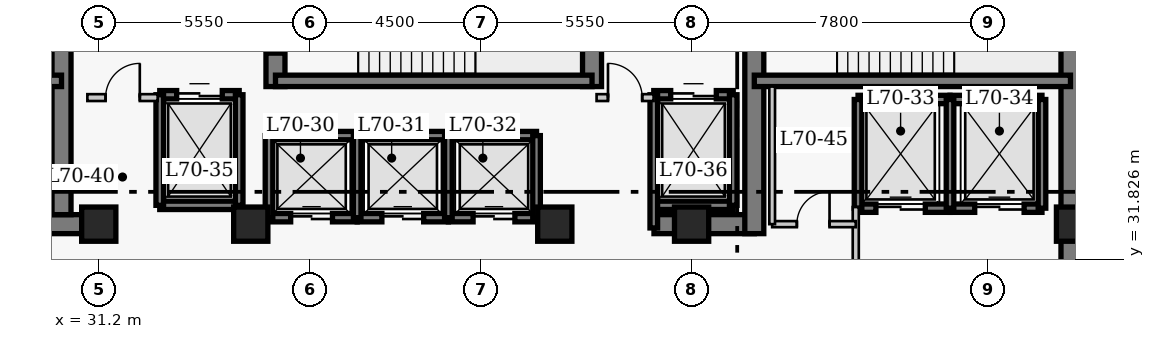
"""IFC4 building model, lengths in metres.
Left out: names, types, materials, properties, quantities, classifications, styles, units other than length and angle.
Written with IfcOpenShell. Run it as: python <this file> out.ifc"""

import sys

from ifc_helpers import new_model, si_unit, direction, frame, frame_2d, origin, origin_2d, place, context, subcontext, project, spatial, rectangle, extrude, element, fill, save


model = new_model("IFC4")
c1 = context("Model", 3, precision=1e-05, world=origin(), true_north=direction((0.0, 1.0)))
c2 = subcontext(c1, "Body", "Model", "MODEL_VIEW")
j1 = project(units=[si_unit("LENGTHUNIT", "METRE"), si_unit("PLANEANGLEUNIT", "RADIAN")], contexts=[c1])
p1 = place(None, origin())
s1 = spatial("IfcSite", under=j1, at=p1, CompositionType="ELEMENT")
p2 = place(p1, origin())
s2 = spatial("IfcBuilding", under=s1, at=p2, CompositionType="ELEMENT")
p3 = place(p2, frame((0.0, 0.0, 281.4)))
s3 = spatial("IfcBuildingStorey", under=s2, at=p3, CompositionType="ELEMENT", Elevation=281.4)
p4 = place(p3, frame((56.77, 27.05, 0.0), z_axis=(0.0, 0.0, 1.0), x_axis=(0.0, 1.0, 0.0)))
e1 = element("IfcWall", 1, at=p4, inside=s3, PredefinedType="SHEAR", context=c2, shape_type="SweptSolid", body=[
    extrude(rectangle(XDim=13.52, YDim=0.5, at=frame_2d((6.76, 0.0))), origin(), (0.0, 0.0, 1.0), 4.0),
])
p5 = place(p3, frame((28.45, 32.75, 0.0), z_axis=(0.0, 0.0, 1.0), x_axis=(1.0, 0.0, 0.0)))
e2 = element("IfcWall", 2, at=p5, inside=s3, PredefinedType="SHEAR", context=c2, shape_type="SweptSolid", body=[
    extrude(rectangle(XDim=2.4, YDim=0.5, at=frame_2d((1.2, 0.0))), origin(), (0.0, 0.0, 1.0), 4.0),
])
p6 = place(p3, frame((45.81, 32.75, 0.0), z_axis=(0.0, 0.0, 1.0), x_axis=(1.0, 0.0, 0.0)))
e3 = element("IfcWall", 3, at=p6, inside=s3, PredefinedType="SHEAR", context=c2, shape_type="SweptSolid", body=[
    extrude(rectangle(XDim=2.64, YDim=0.5, at=frame_2d((1.32, 0.0))), origin(), (0.0, 0.0, 1.0), 4.0),
])
p7 = place(p3, frame((30.22, 33.0, 0.0), z_axis=(0.0, 0.0, 1.0), x_axis=(0.0, 1.0, 0.0)))
e4 = element("IfcWall", 4, at=p7, inside=s3, PredefinedType="SHEAR", context=c2, shape_type="SweptSolid", body=[
    extrude(rectangle(XDim=7.32, YDim=0.5, at=frame_2d((3.66, 0.0))), origin(), (0.0, 0.0, 1.0), 4.0),
])
p8 = place(p3, frame((35.85, 36.37, 0.0), z_axis=(0.0, 0.0, 1.0), x_axis=(0.0, 1.0, 0.0)))
e5 = element("IfcWall", 5, at=p8, inside=s3, PredefinedType="SHEAR", context=c2, shape_type="SweptSolid", body=[
    extrude(rectangle(XDim=3.95, YDim=0.5, at=frame_2d((1.975, 0.0))), origin(), (0.0, 0.0, 1.0), 4.0),
])
p9 = place(p8, frame((0.88, 0.0, 0.0)))
e6 = element("IfcOpeningElement", 6, at=p9, cuts=e5, PredefinedType="OPENING", context=c2, shape_type="SweptSolid", body=[
    extrude(rectangle(XDim=1.1, YDim=2.15, at=frame_2d((0.55, 1.075))), frame((0.0, 0.26, 0.0), z_axis=(0.0, -1.0, 0.0), x_axis=(1.0, 0.0, 0.0)), (0.0, 0.0, 1.0), 0.52),
])
p10 = place(p3, frame((44.18, 36.37, 0.0), z_axis=(0.0, 0.0, 1.0), x_axis=(0.0, 1.0, 0.0)))
e7 = element("IfcWall", 7, at=p10, inside=s3, PredefinedType="SHEAR", context=c2, shape_type="SweptSolid", body=[
    extrude(rectangle(XDim=3.95, YDim=0.5, at=frame_2d((1.975, 0.0))), origin(), (0.0, 0.0, 1.0), 4.0),
])
p11 = place(p3, frame((48.45, 32.5, 0.0), z_axis=(0.0, 0.0, 1.0), x_axis=(0.0, 1.0, 0.0)))
e8 = element("IfcWall", 8, at=p11, inside=s3, PredefinedType="SHEAR", context=c2, shape_type="SweptSolid", body=[
    extrude(rectangle(XDim=7.82, YDim=0.5, at=frame_2d((3.91, 0.0))), origin(), (0.0, 0.0, 1.0), 4.0),
])
p12 = place(p11, frame((5.7, 0.0, 0.0)))
e9 = element("IfcOpeningElement", 9, at=p12, cuts=e8, PredefinedType="OPENING", context=c2, shape_type="SweptSolid", body=[
    extrude(rectangle(XDim=1.1, YDim=2.15, at=frame_2d((0.55, 1.075))), frame((0.0, 0.26, 0.0), z_axis=(0.0, -1.0, 0.0), x_axis=(1.0, 0.0, 0.0)), (0.0, 0.0, 1.0), 0.52),
])
p13 = place(p3, frame((21.9, 36.52, 0.0), z_axis=(0.0, 0.0, 1.0), x_axis=(1.0, 0.0, 0.0)))
e10 = element("IfcWall", 10, at=p13, inside=s3, PredefinedType="SHEAR", context=c2, shape_type="SweptSolid", body=[
    extrude(rectangle(XDim=8.32, YDim=0.3, at=frame_2d((4.16, 0.0))), origin(), (0.0, 0.0, 1.0), 4.0),
])
p14 = place(p13, frame((0.9, 0.0, 0.0)))
e11 = element("IfcOpeningElement", 11, at=p14, cuts=e10, PredefinedType="OPENING", context=c2, shape_type="SweptSolid", body=[
    extrude(rectangle(XDim=1.1, YDim=2.15, at=frame_2d((0.55, 1.075))), frame((0.0, 0.16, 0.0), z_axis=(0.0, -1.0, 0.0), x_axis=(1.0, 0.0, 0.0)), (0.0, 0.0, 1.0), 0.32),
])
p15 = place(p3, frame((35.85, 36.52, 0.0), z_axis=(0.0, 0.0, 1.0), x_axis=(1.0, 0.0, 0.0)))
e12 = element("IfcWall", 12, at=p15, inside=s3, PredefinedType="SHEAR", context=c2, shape_type="SweptSolid", body=[
    extrude(rectangle(XDim=8.33, YDim=0.3, at=frame_2d((4.165, 0.0))), origin(), (0.0, 0.0, 1.0), 4.0),
])
p16 = place(p3, frame((48.45, 36.52, 0.0), z_axis=(0.0, 0.0, 1.0), x_axis=(1.0, 0.0, 0.0)))
e13 = element("IfcWall", 13, at=p16, inside=s3, PredefinedType="SHEAR", context=c2, shape_type="SweptSolid", body=[
    extrude(rectangle(XDim=8.32, YDim=0.3, at=frame_2d((4.16, 0.0))), origin(), (0.0, 0.0, 1.0), 4.0),
])
for number, where, z_axis, x_axis in (
    (14, (31.2, 32.75, 0.0), (0.0, 0.0, 1.0), (1.0, 0.0, 0.0)),
    (15, (35.2, 32.75, 0.0), (0.0, 0.0, 1.0), (1.0, 0.0, 0.0)),
    (16, (43.2, 32.75, 0.0), (0.0, 0.0, 1.0), (1.0, 0.0, 0.0)),
    (17, (46.8, 32.75, 0.0), (0.0, 0.0, 1.0), (1.0, 0.0, 0.0)),
    (18, (56.85, 32.75, 0.0), (0.0, 0.0, 1.0), (1.0, 0.0, 0.0)),
):
    element("IfcColumn", number, at=place(p3, frame(where, z_axis=z_axis, x_axis=x_axis)), inside=s3, PredefinedType="COLUMN", context=c2, shape_type="SweptSolid", body=[
        extrude(rectangle(XDim=0.9, YDim=0.9, at=origin_2d()), origin(), (0.0, 0.0, 1.0), 4.0),
    ])
p17 = place(p3, frame((35.68, 35.08, 0.0), z_axis=(0.0, 0.0, 1.0), x_axis=(1.0, 0.0, 0.0)))
e19 = element("IfcWall", 19, at=p17, inside=s3, PredefinedType="SHEAR", context=c2, shape_type="SweptSolid", body=[
    extrude(rectangle(XDim=2.32, YDim=0.22, at=frame_2d((1.16, 0.0))), origin(), (0.0, 0.0, 1.0), 4.0),
])
p18 = place(p3, frame((35.68, 32.92, 0.0), z_axis=(0.0, 0.0, 1.0), x_axis=(1.0, 0.0, 0.0)))
e20 = element("IfcWall", 20, at=p18, inside=s3, PredefinedType="SHEAR", context=c2, shape_type="SweptSolid", body=[
    extrude(rectangle(XDim=2.32, YDim=0.22, at=frame_2d((1.16, 0.0))), origin(), (0.0, 0.0, 1.0), 4.0),
])
p19 = place(p18, frame((0.57, 0.0, 0.0)))
e21 = element("IfcOpeningElement", 21, at=p19, cuts=e20, PredefinedType="OPENING", context=c2, shape_type="SweptSolid", body=[
    extrude(rectangle(XDim=1.1, YDim=2.15, at=frame_2d((0.55, 1.075))), frame((0.0, 0.12, 0.0), z_axis=(0.0, -1.0, 0.0), x_axis=(1.0, 0.0, 0.0)), (0.0, 0.0, 1.0), 0.24),
])
p20 = place(p3, frame((35.68, 32.92, 0.0), z_axis=(0.0, 0.0, 1.0), x_axis=(0.0, 1.0, 0.0)))
e22 = element("IfcWall", 22, at=p20, inside=s3, PredefinedType="SHEAR", context=c2, shape_type="SweptSolid", body=[
    extrude(rectangle(XDim=2.16, YDim=0.2, at=frame_2d((1.08, 0.0))), origin(), (0.0, 0.0, 1.0), 4.0),
])
p21 = place(p3, frame((38.0, 35.08, 0.0), z_axis=(0.0, 0.0, 1.0), x_axis=(1.0, 0.0, 0.0)))
e23 = element("IfcWall", 23, at=p21, inside=s3, PredefinedType="SHEAR", context=c2, shape_type="SweptSolid", body=[
    extrude(rectangle(XDim=2.4, YDim=0.22, at=frame_2d((1.2, 0.0))), origin(), (0.0, 0.0, 1.0), 4.0),
])
p22 = place(p3, frame((38.0, 32.92, 0.0), z_axis=(0.0, 0.0, 1.0), x_axis=(1.0, 0.0, 0.0)))
e24 = element("IfcWall", 24, at=p22, inside=s3, PredefinedType="SHEAR", context=c2, shape_type="SweptSolid", body=[
    extrude(rectangle(XDim=2.4, YDim=0.22, at=frame_2d((1.2, 0.0))), origin(), (0.0, 0.0, 1.0), 4.0),
])
p23 = place(p22, frame((0.65, 0.0, 0.0)))
e25 = element("IfcOpeningElement", 25, at=p23, cuts=e24, PredefinedType="OPENING", context=c2, shape_type="SweptSolid", body=[
    extrude(rectangle(XDim=1.1, YDim=2.15, at=frame_2d((0.55, 1.075))), frame((0.0, 0.12, 0.0), z_axis=(0.0, -1.0, 0.0), x_axis=(1.0, 0.0, 0.0)), (0.0, 0.0, 1.0), 0.24),
])
p24 = place(p3, frame((38.0, 32.92, 0.0), z_axis=(0.0, 0.0, 1.0), x_axis=(0.0, 1.0, 0.0)))
e26 = element("IfcWall", 26, at=p24, inside=s3, PredefinedType="SHEAR", context=c2, shape_type="SweptSolid", body=[
    extrude(rectangle(XDim=2.16, YDim=0.2, at=frame_2d((1.08, 0.0))), origin(), (0.0, 0.0, 1.0), 4.0),
])
p25 = place(p3, frame((40.4, 35.08, 0.0), z_axis=(0.0, 0.0, 1.0), x_axis=(1.0, 0.0, 0.0)))
e27 = element("IfcWall", 27, at=p25, inside=s3, PredefinedType="SHEAR", context=c2, shape_type="SweptSolid", body=[
    extrude(rectangle(XDim=2.32, YDim=0.22, at=frame_2d((1.16, 0.0))), origin(), (0.0, 0.0, 1.0), 4.0),
])
p26 = place(p3, frame((40.4, 32.92, 0.0), z_axis=(0.0, 0.0, 1.0), x_axis=(1.0, 0.0, 0.0)))
e28 = element("IfcWall", 28, at=p26, inside=s3, PredefinedType="SHEAR", context=c2, shape_type="SweptSolid", body=[
    extrude(rectangle(XDim=2.32, YDim=0.22, at=frame_2d((1.16, 0.0))), origin(), (0.0, 0.0, 1.0), 4.0),
])
p27 = place(p26, frame((0.65, 0.0, 0.0)))
e29 = element("IfcOpeningElement", 29, at=p27, cuts=e28, PredefinedType="OPENING", context=c2, shape_type="SweptSolid", body=[
    extrude(rectangle(XDim=1.1, YDim=2.15, at=frame_2d((0.55, 1.075))), frame((0.0, 0.12, 0.0), z_axis=(0.0, -1.0, 0.0), x_axis=(1.0, 0.0, 0.0)), (0.0, 0.0, 1.0), 0.24),
])
for number, where, z_axis, x_axis in (
    (30, (40.4, 32.92, 0.0), (0.0, 0.0, 1.0), (0.0, 1.0, 0.0)),
    (31, (42.72, 32.92, 0.0), (0.0, 0.0, 1.0), (0.0, 1.0, 0.0)),
):
    element("IfcWall", number, at=place(p3, frame(where, z_axis=z_axis, x_axis=x_axis)), inside=s3, PredefinedType="SHEAR", context=c2, shape_type="SweptSolid", body=[
        extrude(rectangle(XDim=2.16, YDim=0.2, at=frame_2d((1.08, 0.0))), origin(), (0.0, 0.0, 1.0), 4.0),
    ])
p28 = place(p3, frame((51.18, 36.03, 0.0), z_axis=(0.0, 0.0, 1.0), x_axis=(1.0, 0.0, 0.0)))
e32 = element("IfcWall", 32, at=p28, inside=s3, PredefinedType="SHEAR", context=c2, shape_type="SweptSolid", body=[
    extrude(rectangle(XDim=2.42, YDim=0.22, at=frame_2d((1.21, 0.0))), origin(), (0.0, 0.0, 1.0), 4.0),
])
p29 = place(p3, frame((51.18, 33.17, 0.0), z_axis=(0.0, 0.0, 1.0), x_axis=(1.0, 0.0, 0.0)))
e33 = element("IfcWall", 33, at=p29, inside=s3, PredefinedType="SHEAR", context=c2, shape_type="SweptSolid", body=[
    extrude(rectangle(XDim=2.42, YDim=0.22, at=frame_2d((1.21, 0.0))), origin(), (0.0, 0.0, 1.0), 4.0),
])
p30 = place(p29, frame((0.47, 0.0, 0.0)))
e34 = element("IfcOpeningElement", 34, at=p30, cuts=e33, PredefinedType="OPENING", context=c2, shape_type="SweptSolid", body=[
    extrude(rectangle(XDim=1.3, YDim=2.15, at=frame_2d((0.65, 1.075))), frame((0.0, 0.12, 0.0), z_axis=(0.0, -1.0, 0.0), x_axis=(1.0, 0.0, 0.0)), (0.0, 0.0, 1.0), 0.24),
])
p31 = place(p3, frame((51.18, 33.17, 0.0), z_axis=(0.0, 0.0, 1.0), x_axis=(0.0, 1.0, 0.0)))
e35 = element("IfcWall", 35, at=p31, inside=s3, PredefinedType="SHEAR", context=c2, shape_type="SweptSolid", body=[
    extrude(rectangle(XDim=2.86, YDim=0.2, at=frame_2d((1.43, 0.0))), origin(), (0.0, 0.0, 1.0), 4.0),
])
p32 = place(p3, frame((53.6, 36.03, 0.0), z_axis=(0.0, 0.0, 1.0), x_axis=(1.0, 0.0, 0.0)))
e36 = element("IfcWall", 36, at=p32, inside=s3, PredefinedType="SHEAR", context=c2, shape_type="SweptSolid", body=[
    extrude(rectangle(XDim=2.42, YDim=0.22, at=frame_2d((1.21, 0.0))), origin(), (0.0, 0.0, 1.0), 4.0),
])
p33 = place(p3, frame((53.6, 33.17, 0.0), z_axis=(0.0, 0.0, 1.0), x_axis=(1.0, 0.0, 0.0)))
e37 = element("IfcWall", 37, at=p33, inside=s3, PredefinedType="SHEAR", context=c2, shape_type="SweptSolid", body=[
    extrude(rectangle(XDim=2.42, YDim=0.22, at=frame_2d((1.21, 0.0))), origin(), (0.0, 0.0, 1.0), 4.0),
])
p34 = place(p33, frame((0.65, 0.0, 0.0)))
e38 = element("IfcOpeningElement", 38, at=p34, cuts=e37, PredefinedType="OPENING", context=c2, shape_type="SweptSolid", body=[
    extrude(rectangle(XDim=1.3, YDim=2.15, at=frame_2d((0.65, 1.075))), frame((0.0, 0.12, 0.0), z_axis=(0.0, -1.0, 0.0), x_axis=(1.0, 0.0, 0.0)), (0.0, 0.0, 1.0), 0.24),
])
for number, where, z_axis, x_axis in (
    (39, (53.6, 33.17, 0.0), (0.0, 0.0, 1.0), (0.0, 1.0, 0.0)),
    (40, (56.02, 33.17, 0.0), (0.0, 0.0, 1.0), (0.0, 1.0, 0.0)),
):
    element("IfcWall", number, at=place(p3, frame(where, z_axis=z_axis, x_axis=x_axis)), inside=s3, PredefinedType="SHEAR", context=c2, shape_type="SweptSolid", body=[
        extrude(rectangle(XDim=2.86, YDim=0.2, at=frame_2d((1.43, 0.0))), origin(), (0.0, 0.0, 1.0), 4.0),
    ])
p35 = place(p3, frame((32.805, 36.155, 0.0), z_axis=(0.0, 0.0, 1.0), x_axis=(1.0, 0.0, 0.0)))
e41 = element("IfcWall", 41, at=p35, inside=s3, PredefinedType="SHEAR", context=c2, shape_type="SweptSolid", body=[
    extrude(rectangle(XDim=2.09, YDim=0.22, at=frame_2d((1.045, 0.0))), origin(), (0.0, 0.0, 1.0), 4.0),
])
p36 = place(p35, frame((0.445, 0.0, 0.0)))
e42 = element("IfcOpeningElement", 42, at=p36, cuts=e41, PredefinedType="OPENING", context=c2, shape_type="SweptSolid", body=[
    extrude(rectangle(XDim=1.2, YDim=2.15, at=frame_2d((0.6, 1.075))), frame((0.0, 0.12, 0.0), z_axis=(0.0, -1.0, 0.0), x_axis=(1.0, 0.0, 0.0)), (0.0, 0.0, 1.0), 0.24),
])
p37 = place(p3, frame((32.805, 33.245, 0.0), z_axis=(0.0, 0.0, 1.0), x_axis=(1.0, 0.0, 0.0)))
e43 = element("IfcWall", 43, at=p37, inside=s3, PredefinedType="SHEAR", context=c2, shape_type="SweptSolid", body=[
    extrude(rectangle(XDim=2.09, YDim=0.22, at=frame_2d((1.045, 0.0))), origin(), (0.0, 0.0, 1.0), 4.0),
])
for number, where, z_axis, x_axis in (
    (44, (32.805, 33.245, 0.0), (0.0, 0.0, 1.0), (0.0, 1.0, 0.0)),
    (45, (34.895, 33.245, 0.0), (0.0, 0.0, 1.0), (0.0, 1.0, 0.0)),
):
    element("IfcWall", number, at=place(p3, frame(where, z_axis=z_axis, x_axis=x_axis)), inside=s3, PredefinedType="SHEAR", context=c2, shape_type="SweptSolid", body=[
        extrude(rectangle(XDim=2.91, YDim=0.2, at=frame_2d((1.455, 0.0))), origin(), (0.0, 0.0, 1.0), 4.0),
    ])
p38 = place(p3, frame((45.805, 36.155, 0.0), z_axis=(0.0, 0.0, 1.0), x_axis=(1.0, 0.0, 0.0)))
e46 = element("IfcWall", 46, at=p38, inside=s3, PredefinedType="SHEAR", context=c2, shape_type="SweptSolid", body=[
    extrude(rectangle(XDim=2.09, YDim=0.22, at=frame_2d((1.045, 0.0))), origin(), (0.0, 0.0, 1.0), 4.0),
])
p39 = place(p38, frame((0.445, 0.0, 0.0)))
e47 = element("IfcOpeningElement", 47, at=p39, cuts=e46, PredefinedType="OPENING", context=c2, shape_type="SweptSolid", body=[
    extrude(rectangle(XDim=1.2, YDim=2.15, at=frame_2d((0.6, 1.075))), frame((0.0, 0.12, 0.0), z_axis=(0.0, -1.0, 0.0), x_axis=(1.0, 0.0, 0.0)), (0.0, 0.0, 1.0), 0.24),
])
p40 = place(p3, frame((45.805, 33.245, 0.0), z_axis=(0.0, 0.0, 1.0), x_axis=(1.0, 0.0, 0.0)))
e48 = element("IfcWall", 48, at=p40, inside=s3, PredefinedType="SHEAR", context=c2, shape_type="SweptSolid", body=[
    extrude(rectangle(XDim=2.09, YDim=0.22, at=frame_2d((1.045, 0.0))), origin(), (0.0, 0.0, 1.0), 4.0),
])
p41 = place(p3, frame((45.805, 32.65, 0.0), z_axis=(0.0, 0.0, 1.0), x_axis=(0.0, 1.0, 0.0)))
e49 = element("IfcWall", 49, at=p41, inside=s3, PredefinedType="SHEAR", context=c2, shape_type="SweptSolid", body=[
    extrude(rectangle(XDim=3.505, YDim=0.2, at=frame_2d((1.752, 0.0))), origin(), (0.0, 0.0, 1.0), 4.0),
])
p42 = place(p3, frame((47.895, 33.245, 0.0), z_axis=(0.0, 0.0, 1.0), x_axis=(0.0, 1.0, 0.0)))
e50 = element("IfcWall", 50, at=p42, inside=s3, PredefinedType="SHEAR", context=c2, shape_type="SweptSolid", body=[
    extrude(rectangle(XDim=2.91, YDim=0.2, at=frame_2d((1.455, 0.0))), origin(), (0.0, 0.0, 1.0), 4.0),
])
p43 = place(p3, frame((30.9, 36.08, 0.0), z_axis=(0.0, 0.0, 1.0), x_axis=(1.0, 0.0, 0.0)))
e51 = element("IfcWall", 51, at=p43, inside=s3, PredefinedType="PARTITIONING", context=c2, shape_type="SweptSolid", body=[
    extrude(rectangle(XDim=1.85, YDim=0.18, at=frame_2d((0.925, 0.0))), origin(), (0.0, 0.0, 1.0), 3.76),
])
p44 = place(p43, frame((0.48, 0.0, 0.0)))
e52 = element("IfcOpeningElement", 52, at=p44, cuts=e51, PredefinedType="OPENING", context=c2, shape_type="SweptSolid", body=[
    extrude(rectangle(XDim=0.9, YDim=2.15, at=frame_2d((0.45, 1.075))), frame((0.0, 0.1, 0.0), z_axis=(0.0, -1.0, 0.0), x_axis=(1.0, 0.0, 0.0)), (0.0, 0.0, 1.0), 0.2),
])
p45 = place(p3, frame((44.3, 36.08, 0.0), z_axis=(0.0, 0.0, 1.0), x_axis=(1.0, 0.0, 0.0)))
e53 = element("IfcWall", 53, at=p45, inside=s3, PredefinedType="PARTITIONING", context=c2, shape_type="SweptSolid", body=[
    extrude(rectangle(XDim=1.5, YDim=0.18, at=frame_2d((0.75, 0.0))), origin(), (0.0, 0.0, 1.0), 3.76),
])
p46 = place(p45, frame((0.3, 0.0, 0.0)))
e54 = element("IfcOpeningElement", 54, at=p46, cuts=e53, PredefinedType="OPENING", context=c2, shape_type="SweptSolid", body=[
    extrude(rectangle(XDim=0.9, YDim=2.15, at=frame_2d((0.45, 1.075))), frame((0.0, 0.1, 0.0), z_axis=(0.0, -1.0, 0.0), x_axis=(1.0, 0.0, 0.0)), (0.0, 0.0, 1.0), 0.2),
])
p47 = place(p3, frame((51.12, 29.5, 0.0), z_axis=(0.0, 0.0, 1.0), x_axis=(0.0, 1.0, 0.0)))
e55 = element("IfcWall", 55, at=p47, inside=s3, PredefinedType="PARTITIONING", context=c2, shape_type="SweptSolid", body=[
    extrude(rectangle(XDim=3.7, YDim=0.16, at=frame_2d((1.85, 0.0))), origin(), (0.0, 0.0, 1.0), 3.76),
])
p48 = place(p47, frame((0.9, 0.0, 0.0)))
e56 = element("IfcOpeningElement", 56, at=p48, cuts=e55, PredefinedType="OPENING", context=c2, shape_type="SweptSolid", body=[
    extrude(rectangle(XDim=1.1, YDim=2.15, at=frame_2d((0.55, 1.075))), frame((0.0, 0.09, 0.0), z_axis=(0.0, -1.0, 0.0), x_axis=(1.0, 0.0, 0.0)), (0.0, 0.0, 1.0), 0.18),
])
p49 = place(p3, frame((48.92, 32.75, 0.0), z_axis=(0.0, 0.0, 1.0), x_axis=(1.0, 0.0, 0.0)))
e57 = element("IfcWall", 57, at=p49, inside=s3, PredefinedType="PARTITIONING", context=c2, shape_type="SweptSolid", body=[
    extrude(rectangle(XDim=2.2, YDim=0.16, at=frame_2d((1.1, 0.0))), origin(), (0.0, 0.0, 1.0), 3.76),
])
p50 = place(p49, frame((0.65, 0.0, 0.0)))
e58 = element("IfcOpeningElement", 58, at=p50, cuts=e57, PredefinedType="OPENING", context=c2, shape_type="SweptSolid", body=[
    extrude(rectangle(XDim=0.86, YDim=2.05, at=frame_2d((0.43, 1.025))), frame((0.0, 0.09, 0.0), z_axis=(0.0, -1.0, 0.0), x_axis=(1.0, 0.0, 0.0)), (0.0, 0.0, 1.0), 0.18),
])
p51 = place(p3, frame((48.92, 32.75, 0.0), z_axis=(0.0, 0.0, 1.0), x_axis=(0.0, 1.0, 0.0)))
e59 = element("IfcWall", 59, at=p51, inside=s3, PredefinedType="PARTITIONING", context=c2, shape_type="SweptSolid", body=[
    extrude(rectangle(XDim=3.62, YDim=0.15, at=frame_2d((1.81, 0.0))), origin(), (0.0, 0.0, 1.0), 3.76),
])
p52 = place(p19, origin())
e60 = element("IfcDoor", 60, at=p52, inside=s3, OperationType="DOUBLE_DOOR_SLIDING", PredefinedType="DOOR", context=c2, shape_type="SweptSolid", body=[
    extrude(rectangle(XDim=1.1, YDim=2.15, at=frame_2d((0.55, 1.075))), frame((0.0, 0.025, 0.0), z_axis=(0.0, -1.0, 0.0), x_axis=(1.0, 0.0, 0.0)), (0.0, 0.0, 1.0), 0.05),
])
fill(e21, e60)
p53 = place(p23, origin())
e61 = element("IfcDoor", 61, at=p53, inside=s3, OperationType="DOUBLE_DOOR_SLIDING", PredefinedType="DOOR", context=c2, shape_type="SweptSolid", body=[
    extrude(rectangle(XDim=1.1, YDim=2.15, at=frame_2d((0.55, 1.075))), frame((0.0, 0.025, 0.0), z_axis=(0.0, -1.0, 0.0), x_axis=(1.0, 0.0, 0.0)), (0.0, 0.0, 1.0), 0.05),
])
fill(e25, e61)
p54 = place(p27, origin())
e62 = element("IfcDoor", 62, at=p54, inside=s3, OperationType="DOUBLE_DOOR_SLIDING", PredefinedType="DOOR", context=c2, shape_type="SweptSolid", body=[
    extrude(rectangle(XDim=1.1, YDim=2.15, at=frame_2d((0.55, 1.075))), frame((0.0, 0.025, 0.0), z_axis=(0.0, -1.0, 0.0), x_axis=(1.0, 0.0, 0.0)), (0.0, 0.0, 1.0), 0.05),
])
fill(e29, e62)
p55 = place(p30, origin())
e63 = element("IfcDoor", 63, at=p55, inside=s3, OperationType="DOUBLE_DOOR_SLIDING", PredefinedType="DOOR", context=c2, shape_type="SweptSolid", body=[
    extrude(rectangle(XDim=1.3, YDim=2.15, at=frame_2d((0.65, 1.075))), frame((0.0, 0.025, 0.0), z_axis=(0.0, -1.0, 0.0), x_axis=(1.0, 0.0, 0.0)), (0.0, 0.0, 1.0), 0.05),
])
fill(e34, e63)
p56 = place(p34, origin())
e64 = element("IfcDoor", 64, at=p56, inside=s3, OperationType="DOUBLE_DOOR_SLIDING", PredefinedType="DOOR", context=c2, shape_type="SweptSolid", body=[
    extrude(rectangle(XDim=1.3, YDim=2.15, at=frame_2d((0.65, 1.075))), frame((0.0, 0.025, 0.0), z_axis=(0.0, -1.0, 0.0), x_axis=(1.0, 0.0, 0.0)), (0.0, 0.0, 1.0), 0.05),
])
fill(e38, e64)
p57 = place(p36, origin())
e65 = element("IfcDoor", 65, at=p57, inside=s3, OperationType="DOUBLE_DOOR_SLIDING", PredefinedType="DOOR", context=c2, shape_type="SweptSolid", body=[
    extrude(rectangle(XDim=1.2, YDim=2.15, at=frame_2d((0.6, 1.075))), frame((0.0, 0.025, 0.0), z_axis=(0.0, -1.0, 0.0), x_axis=(1.0, 0.0, 0.0)), (0.0, 0.0, 1.0), 0.05),
])
fill(e42, e65)
p58 = place(p39, origin())
e66 = element("IfcDoor", 66, at=p58, inside=s3, OperationType="DOUBLE_DOOR_SLIDING", PredefinedType="DOOR", context=c2, shape_type="SweptSolid", body=[
    extrude(rectangle(XDim=1.2, YDim=2.15, at=frame_2d((0.6, 1.075))), frame((0.0, 0.025, 0.0), z_axis=(0.0, -1.0, 0.0), x_axis=(1.0, 0.0, 0.0)), (0.0, 0.0, 1.0), 0.05),
])
fill(e47, e66)
p59 = place(p44, origin())
e67 = element("IfcDoor", 67, at=p59, inside=s3, OperationType="SINGLE_SWING_RIGHT", PredefinedType="DOOR", context=c2, shape_type="SweptSolid", body=[
    extrude(rectangle(XDim=0.9, YDim=2.15, at=frame_2d((0.45, 1.075))), frame((0.0, 0.025, 0.0), z_axis=(0.0, -1.0, 0.0), x_axis=(1.0, 0.0, 0.0)), (0.0, 0.0, 1.0), 0.05),
])
fill(e52, e67)
p60 = place(p46, origin())
e68 = element("IfcDoor", 68, at=p60, inside=s3, OperationType="SINGLE_SWING_LEFT", PredefinedType="DOOR", context=c2, shape_type="SweptSolid", body=[
    extrude(rectangle(XDim=0.9, YDim=2.15, at=frame_2d((0.45, 1.075))), frame((0.0, 0.025, 0.0), z_axis=(0.0, -1.0, 0.0), x_axis=(1.0, 0.0, 0.0)), (0.0, 0.0, 1.0), 0.05),
])
fill(e54, e68)
p61 = place(p50, origin())
e69 = element("IfcDoor", 69, at=p61, inside=s3, OperationType="SINGLE_SWING_RIGHT", PredefinedType="DOOR", context=c2, shape_type="SweptSolid", body=[
    extrude(rectangle(XDim=0.86, YDim=2.05, at=frame_2d((0.43, 1.025))), frame((0.0, 0.025, 0.0), z_axis=(0.0, -1.0, 0.0), x_axis=(1.0, 0.0, 0.0)), (0.0, 0.0, 1.0), 0.05),
])
fill(e58, e69)
p62 = place(p9, origin())
e70 = element("IfcDoor", 70, at=p62, inside=s3, OperationType="SINGLE_SWING_RIGHT", PredefinedType="DOOR", context=c2, shape_type="SweptSolid", body=[
    extrude(rectangle(XDim=1.1, YDim=2.15, at=frame_2d((0.55, 1.075))), frame((0.0, 0.025, 0.0), z_axis=(0.0, -1.0, 0.0), x_axis=(1.0, 0.0, 0.0)), (0.0, 0.0, 1.0), 0.05),
])
fill(e6, e70)
save(model, sys.argv[1])
